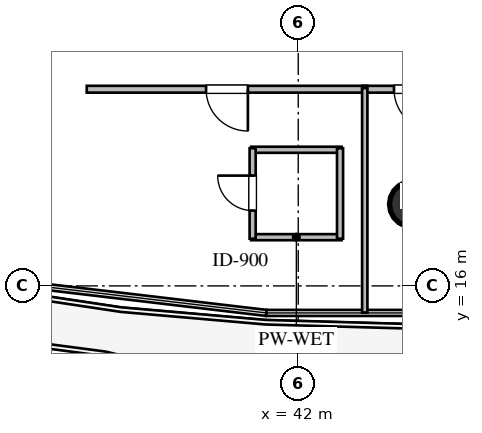
"""IFC4 building model, lengths in metres.
Left out: names, types, materials, properties, quantities, classifications, styles, units other than length and angle.
Written with IfcOpenShell. Run it as: python <this file> out.ifc"""

import sys

from ifc_helpers import new_model, si_unit, direction, frame, frame_2d, origin, origin_2d, place, context, subcontext, project, spatial, rectangle, circle, extrude, element, fill, save


model = new_model("IFC4")
c1 = context("Model", 3, precision=1e-05, world=origin(), true_north=direction((0.0, 1.0)))
c2 = subcontext(c1, "Body", "Model", "MODEL_VIEW")
j1 = project(units=[si_unit("LENGTHUNIT", "METRE"), si_unit("PLANEANGLEUNIT", "RADIAN")], contexts=[c1])
p1 = place(None, origin())
s1 = spatial("IfcSite", under=j1, at=p1, CompositionType="ELEMENT")
p2 = place(p1, origin())
s2 = spatial("IfcBuilding", under=s1, at=p2, CompositionType="ELEMENT")
p3 = place(p2, frame((0.0, 0.0, 178.2)))
s3 = spatial("IfcBuildingStorey", under=s2, at=p3, CompositionType="ELEMENT", Elevation=178.2)
p4 = place(p3, frame((45.0, 18.15, 0.0), z_axis=(0.0, 0.0, 1.0), x_axis=(1.0, 0.0, 0.0)))
e1 = element("IfcColumn", 1, at=p4, inside=s3, PredefinedType="COLUMN", context=c2, shape_type="SweptSolid", body=[
    extrude(circle(Radius=0.6, at=origin_2d()), origin(), (0.0, 0.0, 1.0), 3.6),
])
for number, where, z_axis, x_axis in (
    (2, (40.76, 17.282, 0.0), (0.0, 0.0, 1.0), (1.0, 0.0, 0.0)),
    (3, (40.76, 19.582, 0.0), (0.0, 0.0, 1.0), (1.0, 0.0, 0.0)),
):
    element("IfcWall", number, at=place(p3, frame(where, z_axis=z_axis, x_axis=x_axis)), inside=s3, PredefinedType="PLUMBINGWALL", context=c2, shape_type="SweptSolid", body=[
        extrude(rectangle(XDim=2.38, YDim=0.16, at=frame_2d((1.19, 0.0))), origin(), (0.0, 0.0, 1.0), 3.28),
    ])
p5 = place(p3, frame((40.8, 17.242, 0.0), z_axis=(0.0, 0.0, 1.0), x_axis=(0.0, 1.0, 0.0)))
e4 = element("IfcWall", 4, at=p5, inside=s3, PredefinedType="PLUMBINGWALL", context=c2, shape_type="SweptSolid", body=[
    extrude(rectangle(XDim=2.38, YDim=0.16, at=frame_2d((1.19, 0.0))), origin(), (0.0, 0.0, 1.0), 3.28),
])
p6 = place(p5, frame((0.74, 0.0, 0.0)))
e5 = element("IfcOpeningElement", 5, at=p6, cuts=e4, PredefinedType="OPENING", context=c2, shape_type="SweptSolid", body=[
    extrude(rectangle(XDim=0.92, YDim=2.1, at=frame_2d((0.46, 1.05))), frame((0.0, 0.09, 0.0), z_axis=(0.0, -1.0, 0.0), x_axis=(1.0, 0.0, 0.0)), (0.0, 0.0, 1.0), 0.18),
])
p7 = place(p3, frame((43.1, 17.242, 0.0), z_axis=(0.0, 0.0, 1.0), x_axis=(0.0, 1.0, 0.0)))
e6 = element("IfcWall", 6, at=p7, inside=s3, PredefinedType="PLUMBINGWALL", context=c2, shape_type="SweptSolid", body=[
    extrude(rectangle(XDim=2.38, YDim=0.16, at=frame_2d((1.19, 0.0))), origin(), (0.0, 0.0, 1.0), 3.28),
])
p8 = place(p3, frame((43.815, 21.175, 0.0), z_axis=(0.0, 0.0, 1.0), x_axis=(-1.0, 0.0, 0.0)))
e7 = element("IfcWall", 7, at=p8, inside=s3, PredefinedType="PARTITIONING", context=c2, shape_type="SweptSolid", body=[
    extrude(rectangle(XDim=7.38, YDim=0.18, at=frame_2d((3.69, 0.0))), origin(), (0.0, 0.0, 1.0), 2.916),
])
p9 = place(p8, frame((3.14, 0.0, 0.0)))
e8 = element("IfcOpeningElement", 8, at=p9, cuts=e7, PredefinedType="OPENING", context=c2, shape_type="SweptSolid", body=[
    extrude(rectangle(XDim=1.1, YDim=2.1, at=frame_2d((0.55, 1.05))), frame((0.0, 0.1, 0.0), z_axis=(0.0, -1.0, 0.0), x_axis=(1.0, 0.0, 0.0)), (0.0, 0.0, 1.0), 0.2),
])
p10 = place(p3, frame((46.455, 21.175, 0.0), z_axis=(0.0, 0.0, 1.0), x_axis=(-1.0, 0.0, 0.0)))
e9 = element("IfcWall", 9, at=p10, inside=s3, PredefinedType="PARTITIONING", context=c2, shape_type="SweptSolid", body=[
    extrude(rectangle(XDim=2.77, YDim=0.18, at=frame_2d((1.385, 0.0))), origin(), (0.0, 0.0, 1.0), 2.916),
])
p11 = place(p10, frame((0.835, 0.0, 0.0)))
e10 = element("IfcOpeningElement", 10, at=p11, cuts=e9, PredefinedType="OPENING", context=c2, shape_type="SweptSolid", body=[
    extrude(rectangle(XDim=1.1, YDim=2.1, at=frame_2d((0.55, 1.05))), frame((0.0, 0.1, 0.0), z_axis=(0.0, -1.0, 0.0), x_axis=(1.0, 0.0, 0.0)), (0.0, 0.0, 1.0), 0.2),
])
p12 = place(p3, frame((43.75, 21.205, 0.0), z_axis=(0.0, 0.0, 1.0), x_axis=(0.0, -1.0, 0.0)))
e11 = element("IfcWall", 11, at=p12, inside=s3, PredefinedType="PARTITIONING", context=c2, shape_type="SweptSolid", body=[
    extrude(rectangle(XDim=5.906, YDim=0.14, at=frame_2d((2.953, 0.0))), origin(), (0.0, 0.0, 1.0), 3.28),
])
p13 = place(p6, origin())
e12 = element("IfcDoor", 12, at=p13, inside=s3, OperationType="SINGLE_SWING_RIGHT", PredefinedType="DOOR", context=c2, shape_type="SweptSolid", body=[
    extrude(rectangle(XDim=0.92, YDim=2.1, at=frame_2d((0.46, 1.05))), frame((0.0, 0.025, 0.0), z_axis=(0.0, -1.0, 0.0), x_axis=(1.0, 0.0, 0.0)), (0.0, 0.0, 1.0), 0.05),
])
fill(e5, e12)
p14 = place(p9, origin())
e13 = element("IfcDoor", 13, at=p14, inside=s3, OperationType="SINGLE_SWING_LEFT", PredefinedType="DOOR", context=c2, shape_type="SweptSolid", body=[
    extrude(rectangle(XDim=1.1, YDim=2.1, at=frame_2d((0.55, 1.05))), frame((0.0, 0.025, 0.0), z_axis=(0.0, -1.0, 0.0), x_axis=(1.0, 0.0, 0.0)), (0.0, 0.0, 1.0), 0.05),
])
fill(e8, e13)
p15 = place(p11, origin())
e14 = element("IfcDoor", 14, at=p15, inside=s3, OperationType="SINGLE_SWING_LEFT", PredefinedType="DOOR", context=c2, shape_type="SweptSolid", body=[
    extrude(rectangle(XDim=1.1, YDim=2.1, at=frame_2d((0.55, 1.05))), frame((0.0, 0.025, 0.0), z_axis=(0.0, -1.0, 0.0), x_axis=(1.0, 0.0, 0.0)), (0.0, 0.0, 1.0), 0.05),
])
fill(e10, e14)
save(model, sys.argv[1])
